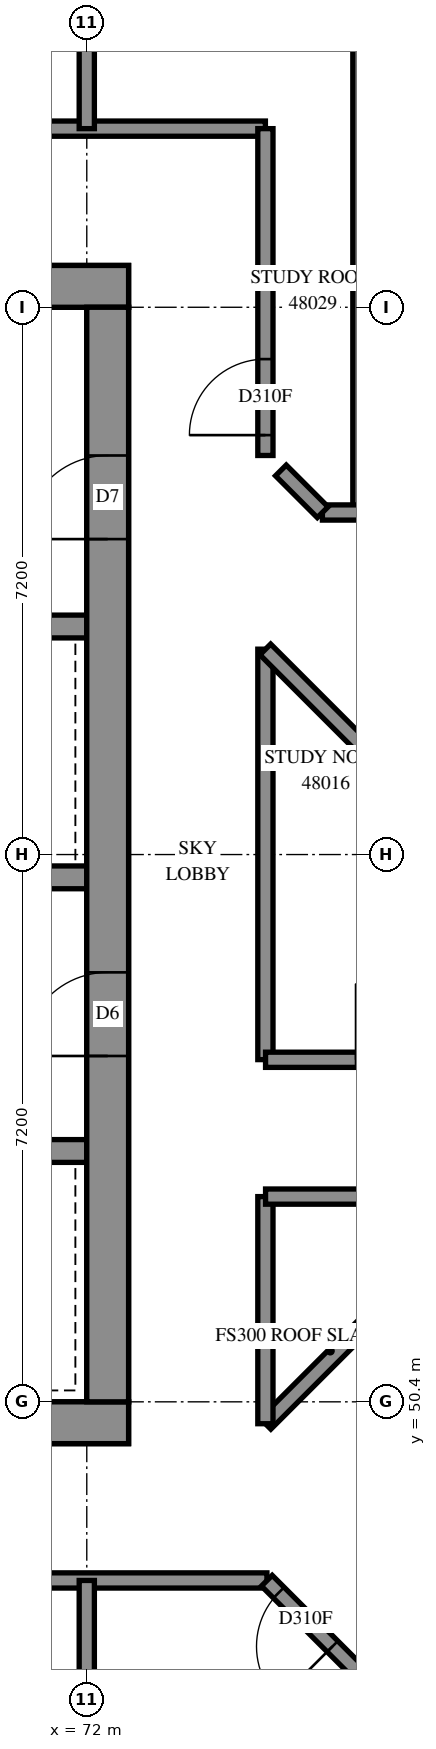
"""IFC4 building model, lengths in metres.
Left out: names, types, materials, properties, quantities, classifications, styles, units other than length and angle.
Written with IfcOpenShell. Run it as: python <this file> out.ifc"""

import sys

from ifc_helpers import new_model, si_unit, direction, frame, frame_2d, origin, place, context, subcontext, project, spatial, rectangle, extrude, element, fill, save


model = new_model("IFC4")
c1 = context("Model", 3, precision=1e-05, world=origin(), true_north=direction((0.0, 1.0)))
c2 = subcontext(c1, "Body", "Model", "MODEL_VIEW")
j1 = project(units=[si_unit("LENGTHUNIT", "METRE"), si_unit("PLANEANGLEUNIT", "RADIAN")], contexts=[c1])
p1 = place(None, origin())
s1 = spatial("IfcSite", under=j1, at=p1, CompositionType="ELEMENT")
p2 = place(p1, origin())
s2 = spatial("IfcBuilding", under=s1, at=p2, CompositionType="ELEMENT")
p3 = place(p2, frame((0.0, 0.0, 176.2)))
s3 = spatial("IfcBuildingStorey", under=s2, at=p3, CompositionType="ELEMENT", Elevation=176.2)
p4 = place(p3, frame((57.05, 50.125, -0.3), z_axis=(0.0, 0.0, 1.0), x_axis=(1.0, 0.0, 0.0)))
e1 = element("IfcWall", 1, at=p4, inside=s3, PredefinedType="SHEAR", context=c2, shape_type="SweptSolid", body=[
    extrude(rectangle(XDim=15.5, YDim=0.55, at=frame_2d((7.75, 0.0))), origin(), (0.0, 0.0, 1.0), 3.5),
])
p5 = place(p3, frame((57.05, 65.075, -0.3), z_axis=(0.0, 0.0, 1.0), x_axis=(1.0, 0.0, 0.0)))
e2 = element("IfcWall", 2, at=p5, inside=s3, PredefinedType="SHEAR", context=c2, shape_type="SweptSolid", body=[
    extrude(rectangle(XDim=15.5, YDim=0.55, at=frame_2d((7.75, 0.0))), origin(), (0.0, 0.0, 1.0), 3.5),
])
p6 = place(p5, frame((10.55, 0.0, 0.3)))
e3 = element("IfcOpeningElement", 3, at=p6, cuts=e2, PredefinedType="OPENING", context=c2, shape_type="SweptSolid", body=[
    extrude(rectangle(XDim=0.8, YDim=2.1, at=frame_2d((0.4, 1.05))), frame((0.0, 0.285, 0.0), z_axis=(0.0, -1.0, 0.0), x_axis=(1.0, 0.0, 0.0)), (0.0, 0.0, 1.0), 0.57),
])
p7 = place(p3, frame((72.275, 50.4, -0.3), z_axis=(0.0, 0.0, 1.0), x_axis=(0.0, 1.0, 0.0)))
e4 = element("IfcWall", 4, at=p7, inside=s3, PredefinedType="SHEAR", context=c2, shape_type="SweptSolid", body=[
    extrude(rectangle(XDim=14.4, YDim=0.55, at=frame_2d((7.2, 0.0))), origin(), (0.0, 0.0, 1.0), 3.5),
])
p8 = place(p7, frame((4.55, 0.0, 0.3)))
e5 = element("IfcOpeningElement", 5, at=p8, cuts=e4, PredefinedType="OPENING", context=c2, shape_type="SweptSolid", body=[
    extrude(rectangle(XDim=1.1, YDim=2.1, at=frame_2d((0.55, 1.05))), frame((0.0, 0.285, 0.0), z_axis=(0.0, -1.0, 0.0), x_axis=(1.0, 0.0, 0.0)), (0.0, 0.0, 1.0), 0.57),
])
p9 = place(p7, frame((11.35, 0.0, 0.3)))
e6 = element("IfcOpeningElement", 6, at=p9, cuts=e4, PredefinedType="OPENING", context=c2, shape_type="SweptSolid", body=[
    extrude(rectangle(XDim=1.1, YDim=2.1, at=frame_2d((0.55, 1.05))), frame((0.0, 0.285, 0.0), z_axis=(0.0, -1.0, 0.0), x_axis=(1.0, 0.0, 0.0)), (0.0, 0.0, 1.0), 0.57),
])
p10 = place(p3, frame((57.6, 53.7, 0.0), z_axis=(0.0, 0.0, 1.0), x_axis=(1.0, 0.0, 0.0)))
e7 = element("IfcWall", 7, at=p10, inside=s3, PredefinedType="SOLIDWALL", context=c2, shape_type="SweptSolid", body=[
    extrude(rectangle(XDim=14.4, YDim=0.3, at=frame_2d((7.2, 0.0))), origin(), (0.0, 0.0, 1.0), 3.9),
])
p11 = place(p10, frame((1.35, 0.0, 0.0)))
e8 = element("IfcOpeningElement", 8, at=p11, cuts=e7, PredefinedType="OPENING", context=c2, shape_type="SweptSolid", body=[
    extrude(rectangle(XDim=0.9, YDim=2.1, at=frame_2d((0.45, 1.05))), frame((0.0, 0.16, 0.0), z_axis=(0.0, -1.0, 0.0), x_axis=(1.0, 0.0, 0.0)), (0.0, 0.0, 1.0), 0.32),
])
p12 = place(p10, frame((4.95, 0.0, 0.0)))
e9 = element("IfcOpeningElement", 9, at=p12, cuts=e7, PredefinedType="OPENING", context=c2, shape_type="SweptSolid", body=[
    extrude(rectangle(XDim=0.9, YDim=2.1, at=frame_2d((0.45, 1.05))), frame((0.0, 0.16, 0.0), z_axis=(0.0, -1.0, 0.0), x_axis=(1.0, 0.0, 0.0)), (0.0, 0.0, 1.0), 0.32),
])
p13 = place(p10, frame((8.55, 0.0, 0.0)))
e10 = element("IfcOpeningElement", 10, at=p13, cuts=e7, PredefinedType="OPENING", context=c2, shape_type="SweptSolid", body=[
    extrude(rectangle(XDim=0.9, YDim=2.1, at=frame_2d((0.45, 1.05))), frame((0.0, 0.16, 0.0), z_axis=(0.0, -1.0, 0.0), x_axis=(1.0, 0.0, 0.0)), (0.0, 0.0, 1.0), 0.32),
])
p14 = place(p10, frame((12.05, 0.0, 0.0)))
e11 = element("IfcOpeningElement", 11, at=p14, cuts=e7, PredefinedType="OPENING", context=c2, shape_type="SweptSolid", body=[
    extrude(rectangle(XDim=1.1, YDim=2.1, at=frame_2d((0.55, 1.05))), frame((0.0, 0.16, 0.0), z_axis=(0.0, -1.0, 0.0), x_axis=(1.0, 0.0, 0.0)), (0.0, 0.0, 1.0), 0.32),
])
p15 = place(p3, frame((57.6, 57.3, 0.0), z_axis=(0.0, 0.0, 1.0), x_axis=(1.0, 0.0, 0.0)))
e12 = element("IfcWall", 12, at=p15, inside=s3, PredefinedType="SOLIDWALL", context=c2, shape_type="SweptSolid", body=[
    extrude(rectangle(XDim=14.4, YDim=0.3, at=frame_2d((7.2, 0.0))), origin(), (0.0, 0.0, 1.0), 3.9),
])
p16 = place(p15, frame((1.25, 0.0, 0.0)))
e13 = element("IfcOpeningElement", 13, at=p16, cuts=e12, PredefinedType="OPENING", context=c2, shape_type="SweptSolid", body=[
    extrude(rectangle(XDim=1.1, YDim=2.1, at=frame_2d((0.55, 1.05))), frame((0.0, 0.16, 0.0), z_axis=(0.0, -1.0, 0.0), x_axis=(1.0, 0.0, 0.0)), (0.0, 0.0, 1.0), 0.32),
])
p17 = place(p15, frame((4.85, 0.0, 0.0)))
e14 = element("IfcOpeningElement", 14, at=p17, cuts=e12, PredefinedType="OPENING", context=c2, shape_type="SweptSolid", body=[
    extrude(rectangle(XDim=1.1, YDim=2.1, at=frame_2d((0.55, 1.05))), frame((0.0, 0.16, 0.0), z_axis=(0.0, -1.0, 0.0), x_axis=(1.0, 0.0, 0.0)), (0.0, 0.0, 1.0), 0.32),
])
p18 = place(p15, frame((8.45, 0.0, 0.0)))
e15 = element("IfcOpeningElement", 15, at=p18, cuts=e12, PredefinedType="OPENING", context=c2, shape_type="SweptSolid", body=[
    extrude(rectangle(XDim=1.1, YDim=2.1, at=frame_2d((0.55, 1.05))), frame((0.0, 0.16, 0.0), z_axis=(0.0, -1.0, 0.0), x_axis=(1.0, 0.0, 0.0)), (0.0, 0.0, 1.0), 0.32),
])
p19 = place(p15, frame((12.05, 0.0, 0.0)))
e16 = element("IfcOpeningElement", 16, at=p19, cuts=e12, PredefinedType="OPENING", context=c2, shape_type="SweptSolid", body=[
    extrude(rectangle(XDim=1.1, YDim=2.1, at=frame_2d((0.55, 1.05))), frame((0.0, 0.16, 0.0), z_axis=(0.0, -1.0, 0.0), x_axis=(1.0, 0.0, 0.0)), (0.0, 0.0, 1.0), 0.32),
])
p20 = place(p3, frame((64.8, 60.6, 0.0), z_axis=(0.0, 0.0, 1.0), x_axis=(1.0, 0.0, 0.0)))
e17 = element("IfcWall", 17, at=p20, inside=s3, PredefinedType="SOLIDWALL", context=c2, shape_type="SweptSolid", body=[
    extrude(rectangle(XDim=7.2, YDim=0.3, at=frame_2d((3.6, 0.0))), origin(), (0.0, 0.0, 1.0), 3.9),
])
p21 = place(p3, frame((55.25, 48.05, 0.0), z_axis=(0.0, 0.0, 1.0), x_axis=(1.0, 0.0, 0.0)))
e18 = element("IfcWall", 18, at=p21, inside=s3, PredefinedType="PARTITIONING", context=c2, shape_type="SweptSolid", body=[
    extrude(rectangle(XDim=19.12, YDim=0.2, at=frame_2d((9.56, 0.0))), origin(), (0.0, 0.0, 1.0), 3.9),
])
p22 = place(p21, frame((4.383, 0.0, 0.0)))
e19 = element("IfcOpeningElement", 19, at=p22, cuts=e18, PredefinedType="OPENING", context=c2, shape_type="SweptSolid", body=[
    extrude(rectangle(XDim=1.0, YDim=2.1, at=frame_2d((0.5, 1.05))), frame((0.0, 0.11, 0.0), z_axis=(0.0, -1.0, 0.0), x_axis=(1.0, 0.0, 0.0)), (0.0, 0.0, 1.0), 0.22),
])
p23 = place(p21, frame((6.457, 0.0, 0.0)))
e20 = element("IfcOpeningElement", 20, at=p23, cuts=e18, PredefinedType="OPENING", context=c2, shape_type="SweptSolid", body=[
    extrude(rectangle(XDim=1.0, YDim=2.1, at=frame_2d((0.5, 1.05))), frame((0.0, 0.11, 0.0), z_axis=(0.0, -1.0, 0.0), x_axis=(1.0, 0.0, 0.0)), (0.0, 0.0, 1.0), 0.22),
])
p24 = place(p21, frame((11.582, 0.0, 0.0)))
e21 = element("IfcOpeningElement", 21, at=p24, cuts=e18, PredefinedType="OPENING", context=c2, shape_type="SweptSolid", body=[
    extrude(rectangle(XDim=1.0, YDim=2.1, at=frame_2d((0.5, 1.05))), frame((0.0, 0.11, 0.0), z_axis=(0.0, -1.0, 0.0), x_axis=(1.0, 0.0, 0.0)), (0.0, 0.0, 1.0), 0.22),
])
p25 = place(p21, frame((13.658, 0.0, 0.0)))
e22 = element("IfcOpeningElement", 22, at=p25, cuts=e18, PredefinedType="OPENING", context=c2, shape_type="SweptSolid", body=[
    extrude(rectangle(XDim=1.0, YDim=2.1, at=frame_2d((0.5, 1.05))), frame((0.0, 0.11, 0.0), z_axis=(0.0, -1.0, 0.0), x_axis=(1.0, 0.0, 0.0)), (0.0, 0.0, 1.0), 0.22),
])
p26 = place(p3, frame((55.25, 67.15, 0.0), z_axis=(0.0, 0.0, 1.0), x_axis=(1.0, 0.0, 0.0)))
e23 = element("IfcWall", 23, at=p26, inside=s3, PredefinedType="PARTITIONING", context=c2, shape_type="SweptSolid", body=[
    extrude(rectangle(XDim=19.1, YDim=0.2, at=frame_2d((9.55, 0.0))), origin(), (0.0, 0.0, 1.0), 3.9),
])
p27 = place(p26, frame((4.442, 0.0, 0.0)))
e24 = element("IfcOpeningElement", 24, at=p27, cuts=e23, PredefinedType="OPENING", context=c2, shape_type="SweptSolid", body=[
    extrude(rectangle(XDim=1.0, YDim=2.1, at=frame_2d((0.5, 1.05))), frame((0.0, 0.11, 0.0), z_axis=(0.0, -1.0, 0.0), x_axis=(1.0, 0.0, 0.0)), (0.0, 0.0, 1.0), 0.22),
])
p28 = place(p26, frame((6.518, 0.0, 0.0)))
e25 = element("IfcOpeningElement", 25, at=p28, cuts=e23, PredefinedType="OPENING", context=c2, shape_type="SweptSolid", body=[
    extrude(rectangle(XDim=1.0, YDim=2.1, at=frame_2d((0.5, 1.05))), frame((0.0, 0.11, 0.0), z_axis=(0.0, -1.0, 0.0), x_axis=(1.0, 0.0, 0.0)), (0.0, 0.0, 1.0), 0.22),
])
p29 = place(p26, frame((11.643, 0.0, 0.0)))
e26 = element("IfcOpeningElement", 26, at=p29, cuts=e23, PredefinedType="OPENING", context=c2, shape_type="SweptSolid", body=[
    extrude(rectangle(XDim=1.0, YDim=2.1, at=frame_2d((0.5, 1.05))), frame((0.0, 0.11, 0.0), z_axis=(0.0, -1.0, 0.0), x_axis=(1.0, 0.0, 0.0)), (0.0, 0.0, 1.0), 0.22),
])
p30 = place(p26, frame((13.717, 0.0, 0.0)))
e27 = element("IfcOpeningElement", 27, at=p30, cuts=e23, PredefinedType="OPENING", context=c2, shape_type="SweptSolid", body=[
    extrude(rectangle(XDim=1.0, YDim=2.1, at=frame_2d((0.5, 1.05))), frame((0.0, 0.11, 0.0), z_axis=(0.0, -1.0, 0.0), x_axis=(1.0, 0.0, 0.0)), (0.0, 0.0, 1.0), 0.22),
])
p31 = place(p3, frame((75.6, 62.1, 0.0), z_axis=(0.0, 0.0, 1.0), x_axis=(0.0, 1.0, 0.0)))
e28 = element("IfcWall", 28, at=p31, inside=s3, PredefinedType="PARTITIONING", context=c2, shape_type="SweptSolid", body=[
    extrude(rectangle(XDim=7.97, YDim=0.2, at=frame_2d((3.985, 0.0))), origin(), (0.0, 0.0, 1.0), 3.9),
])
p32 = place(p3, frame((74.35, 54.902, 0.0), z_axis=(0.0, 0.0, 1.0), x_axis=(0.0, 1.0, 0.0)))
e29 = element("IfcWall", 29, at=p32, inside=s3, PredefinedType="PARTITIONING", context=c2, shape_type="SweptSolid", body=[
    extrude(rectangle(XDim=5.4, YDim=0.2, at=frame_2d((2.7, 0.0))), origin(), (0.0, 0.0, 1.0), 3.9),
])
p33 = place(p3, frame((74.352, 54.9, 0.0), z_axis=(0.0, 0.0, 1.0), x_axis=(1.0, 0.0, 0.0)))
e30 = element("IfcWall", 30, at=p33, inside=s3, PredefinedType="PARTITIONING", context=c2, shape_type="SweptSolid", body=[
    extrude(rectangle(XDim=4.788, YDim=0.2, at=frame_2d((2.394, 0.0))), origin(), (0.0, 0.0, 1.0), 3.9),
])
p34 = place(p33, frame((1.19, 0.0, 0.0)))
e31 = element("IfcOpeningElement", 31, at=p34, cuts=e30, PredefinedType="OPENING", context=c2, shape_type="SweptSolid", body=[
    extrude(rectangle(XDim=1.0, YDim=2.1, at=frame_2d((0.5, 1.05))), frame((0.0, 0.11, 0.0), z_axis=(0.0, -1.0, 0.0), x_axis=(1.0, 0.0, 0.0)), (0.0, 0.0, 1.0), 0.22),
])
p35 = place(p3, frame((74.349, 60.299, 0.0), z_axis=(0.0, 0.0, 1.0), x_axis=(0.7071067812, -0.7071067812, 0.0)))
e32 = element("IfcWall", 32, at=p35, inside=s3, PredefinedType="PARTITIONING", context=c2, shape_type="SweptSolid", body=[
    extrude(rectangle(XDim=4.452, YDim=0.2, at=frame_2d((2.226, 0.0))), origin(), (0.0, 0.0, 1.0), 3.9),
])
p36 = place(p3, frame((74.35, 62.85, 0.0), z_axis=(0.0, 0.0, 1.0), x_axis=(0.0, 1.0, 0.0)))
e33 = element("IfcWall", 33, at=p36, inside=s3, PredefinedType="PARTITIONING", context=c2, shape_type="SweptSolid", body=[
    extrude(rectangle(XDim=4.3, YDim=0.2, at=frame_2d((2.15, 0.0))), origin(), (0.0, 0.0, 1.0), 3.9),
])
p37 = place(p36, frame((0.268, 0.0, 0.0)))
e34 = element("IfcOpeningElement", 34, at=p37, cuts=e33, PredefinedType="OPENING", context=c2, shape_type="SweptSolid", body=[
    extrude(rectangle(XDim=1.0, YDim=2.1, at=frame_2d((0.5, 1.05))), frame((0.0, 0.11, 0.0), z_axis=(0.0, -1.0, 0.0), x_axis=(1.0, 0.0, 0.0)), (0.0, 0.0, 1.0), 0.22),
])
p38 = place(p3, frame((74.351, 50.111, 0.0), z_axis=(0.0, 0.0, 1.0), x_axis=(0.7071067812, 0.7071067812, 0.0)))
e35 = element("IfcWall", 35, at=p38, inside=s3, PredefinedType="PARTITIONING", context=c2, shape_type="SweptSolid", body=[
    extrude(rectangle(XDim=4.226, YDim=0.2, at=frame_2d((2.113, 0.0))), origin(), (0.0, 0.0, 1.0), 3.9),
])
p39 = place(p3, frame((77.287, 45.127, 0.0), z_axis=(0.0, 0.0, 1.0), x_axis=(-0.7069614206, 0.7072521119, 0.0)))
e36 = element("IfcWall", 36, at=p39, inside=s3, PredefinedType="PARTITIONING", context=c2, shape_type="SweptSolid", body=[
    extrude(rectangle(XDim=4.128, YDim=0.2, at=frame_2d((2.064, 0.0))), origin(), (0.0, 0.0, 1.0), 3.9),
])
p40 = place(p39, frame((2.906, 0.0, 0.0)))
e37 = element("IfcOpeningElement", 37, at=p40, cuts=e36, PredefinedType="OPENING", context=c2, shape_type="SweptSolid", body=[
    extrude(rectangle(XDim=1.0, YDim=2.1, at=frame_2d((0.5, 1.05))), frame((0.0, 0.11, 0.0), z_axis=(0.0, -1.0, 0.0), x_axis=(1.0, 0.0, 0.0)), (0.0, 0.0, 1.0), 0.22),
])
p41 = place(p3, frame((75.1, 62.1, 0.0), z_axis=(0.0, 0.0, 1.0), x_axis=(1.0, 0.0, 0.0)))
e38 = element("IfcWall", 38, at=p41, inside=s3, PredefinedType="PARTITIONING", context=c2, shape_type="SweptSolid", body=[
    extrude(rectangle(XDim=4.1, YDim=0.2, at=frame_2d((2.05, 0.0))), origin(), (0.0, 0.0, 1.0), 3.9),
])
p42 = place(p3, frame((74.35, 50.112, 0.0), z_axis=(0.0, 0.0, 1.0), x_axis=(0.0, 1.0, 0.0)))
e39 = element("IfcWall", 39, at=p42, inside=s3, PredefinedType="PARTITIONING", context=c2, shape_type="SweptSolid", body=[
    extrude(rectangle(XDim=2.988, YDim=0.2, at=frame_2d((1.494, 0.0))), origin(), (0.0, 0.0, 1.0), 3.9),
])
p43 = place(p3, frame((74.352, 53.1, 0.0), z_axis=(0.0, 0.0, 1.0), x_axis=(1.0, 0.0, 0.0)))
e40 = element("IfcWall", 40, at=p43, inside=s3, PredefinedType="PARTITIONING", context=c2, shape_type="SweptSolid", body=[
    extrude(rectangle(XDim=2.986, YDim=0.2, at=frame_2d((1.493, 0.0))), origin(), (0.0, 0.0, 1.0), 3.9),
])
for number, where, z_axis, x_axis in (
    (41, (72.0, 45.13, 0.0), (0.0, 0.0, 1.0), (0.0, 1.0, 0.0)),
    (42, (72.0, 67.15, 0.0), (0.0, 0.0, 1.0), (0.0, 1.0, 0.0)),
):
    element("IfcWall", number, at=place(p3, frame(where, z_axis=z_axis, x_axis=x_axis)), inside=s3, PredefinedType="PARTITIONING", context=c2, shape_type="SweptSolid", body=[
        extrude(rectangle(XDim=2.92, YDim=0.2, at=frame_2d((1.46, 0.0))), origin(), (0.0, 0.0, 1.0), 3.9),
    ])
p44 = place(p3, frame((74.553, 62.654, 0.0), z_axis=(0.0, 0.0, 1.0), x_axis=(0.7071067812, -0.7071067812, 0.0)))
e43 = element("IfcWall", 43, at=p44, inside=s3, PredefinedType="PARTITIONING", context=c2, shape_type="SweptSolid", body=[
    extrude(rectangle(XDim=0.778, YDim=0.2, at=frame_2d((0.389, 0.0))), origin(), (0.0, 0.0, 1.0), 3.9),
])
p45 = place(p8, origin())
e44 = element("IfcDoor", 44, at=p45, inside=s3, OperationType="DOUBLE_DOOR_SINGLE_SWING", PredefinedType="DOOR", context=c2, shape_type="SweptSolid", body=[
    extrude(rectangle(XDim=1.1, YDim=2.1, at=frame_2d((0.55, 1.05))), frame((0.0, 0.025, 0.0), z_axis=(0.0, -1.0, 0.0), x_axis=(1.0, 0.0, 0.0)), (0.0, 0.0, 1.0), 0.05),
])
fill(e5, e44)
p46 = place(p9, origin())
e45 = element("IfcDoor", 45, at=p46, inside=s3, OperationType="SINGLE_SWING_RIGHT", PredefinedType="DOOR", context=c2, shape_type="SweptSolid", body=[
    extrude(rectangle(XDim=1.1, YDim=2.1, at=frame_2d((0.55, 1.05))), frame((0.0, 0.025, 0.0), z_axis=(0.0, -1.0, 0.0), x_axis=(1.0, 0.0, 0.0)), (0.0, 0.0, 1.0), 0.05),
])
fill(e6, e45)
p47 = place(p34, origin())
e46 = element("IfcDoor", 46, at=p47, inside=s3, OperationType="SINGLE_SWING_LEFT", PredefinedType="DOOR", context=c2, shape_type="SweptSolid", body=[
    extrude(rectangle(XDim=1.0, YDim=2.1, at=frame_2d((0.5, 1.05))), frame((0.0, 0.025, 0.0), z_axis=(0.0, -1.0, 0.0), x_axis=(1.0, 0.0, 0.0)), (0.0, 0.0, 1.0), 0.05),
])
fill(e31, e46)
p48 = place(p40, origin())
e47 = element("IfcDoor", 47, at=p48, inside=s3, OperationType="SINGLE_SWING_LEFT", PredefinedType="DOOR", context=c2, shape_type="SweptSolid", body=[
    extrude(rectangle(XDim=1.0, YDim=2.1, at=frame_2d((0.5, 1.05))), frame((0.0, 0.025, 0.0), z_axis=(0.0, -1.0, 0.0), x_axis=(1.0, 0.0, 0.0)), (0.0, 0.0, 1.0), 0.05),
])
fill(e37, e47)
p49 = place(p37, origin())
e48 = element("IfcDoor", 48, at=p49, inside=s3, OperationType="SINGLE_SWING_RIGHT", PredefinedType="DOOR", context=c2, shape_type="SweptSolid", body=[
    extrude(rectangle(XDim=1.0, YDim=2.1, at=frame_2d((0.5, 1.05))), frame((0.0, 0.025, 0.0), z_axis=(0.0, -1.0, 0.0), x_axis=(1.0, 0.0, 0.0)), (0.0, 0.0, 1.0), 0.05),
])
fill(e34, e48)
save(model, sys.argv[1])
